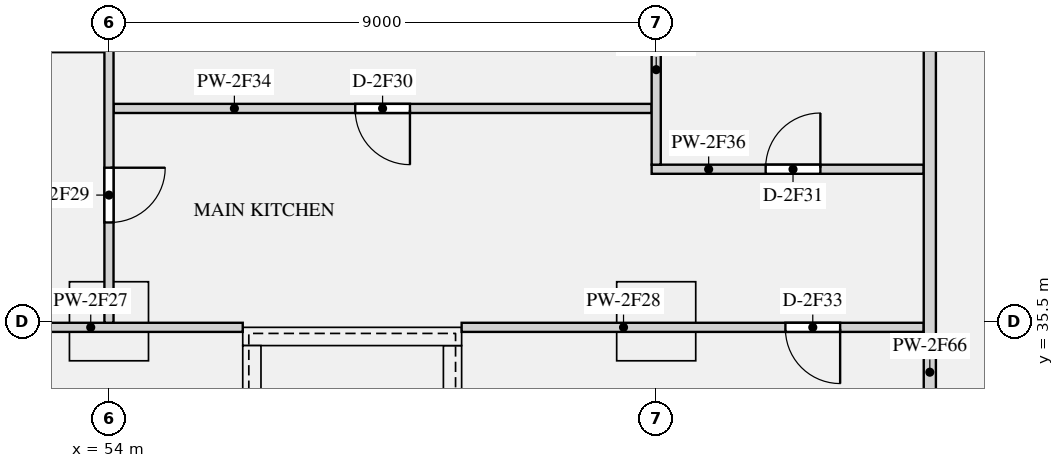
"""IFC4 building model, lengths in metres.
Left out: names, types, materials, properties, quantities, classifications, styles, units other than length and angle.
Written with IfcOpenShell. Run it as: python <this file> out.ifc"""

import sys

from ifc_helpers import new_model, si_unit, direction, frame, frame_2d, origin, origin_2d, place, context, subcontext, project, spatial, rectangle, extrude, element, fill, save


model = new_model("IFC4")
c1 = context("Model", 3, precision=1e-05, world=origin(), true_north=direction((0.0, 1.0)))
c2 = subcontext(c1, "Body", "Model", "MODEL_VIEW")
j1 = project(units=[si_unit("LENGTHUNIT", "METRE"), si_unit("PLANEANGLEUNIT", "RADIAN")], contexts=[c1])
p1 = place(None, origin())
s1 = spatial("IfcSite", under=j1, at=p1, CompositionType="ELEMENT")
p2 = place(p1, origin())
s2 = spatial("IfcBuilding", under=s1, at=p2, CompositionType="ELEMENT")
p3 = place(p2, frame((0.0, 0.0, 127.65)))
s3 = spatial("IfcBuildingStorey", under=s2, at=p3, CompositionType="ELEMENT", Elevation=127.65)
for number, where, z_axis, x_axis in (
    (1, (54.0, 35.5, 0.0), (0.0, 0.0, 1.0), (1.0, 0.0, 0.0)),
    (2, (63.0, 35.5, 0.0), (0.0, 0.0, 1.0), (1.0, 0.0, 0.0)),
):
    element("IfcColumn", number, at=place(p3, frame(where, z_axis=z_axis, x_axis=x_axis)), inside=s3, PredefinedType="COLUMN", context=c2, shape_type="SweptSolid", body=[
        extrude(rectangle(XDim=1.3, YDim=1.3, at=origin_2d()), origin(), (0.0, 0.0, 1.0), 3.15),
    ])
p4 = place(p3, frame((56.2, 35.25, 0.0), z_axis=(0.0, 0.0, 1.0), x_axis=(1.0, 0.0, 0.0)))
e3 = element("IfcWall", 3, at=p4, inside=s3, PredefinedType="SHEAR", context=c2, shape_type="SweptSolid", body=[
    extrude(rectangle(XDim=3.6, YDim=0.3, at=frame_2d((1.8, 0.0))), origin(), (0.0, 0.0, 1.0), 3.15),
])
for number, where, z_axis, x_axis in (
    (4, (56.35, 27.3, 0.0), (0.0, 0.0, 1.0), (0.0, 1.0, 0.0)),
    (5, (59.65, 27.3, 0.0), (0.0, 0.0, 1.0), (0.0, 1.0, 0.0)),
):
    element("IfcWall", number, at=place(p3, frame(where, z_axis=z_axis, x_axis=x_axis)), inside=s3, PredefinedType="SHEAR", context=c2, shape_type="SweptSolid", body=[
        extrude(rectangle(XDim=7.8, YDim=0.3, at=frame_2d((3.9, 0.0))), origin(), (0.0, 0.0, 1.0), 3.15),
    ])
p5 = place(p3, frame((48.1, 35.4, 0.0), z_axis=(0.0, 0.0, 1.0), x_axis=(1.0, 0.0, 0.0)))
e6 = element("IfcWall", 6, at=p5, inside=s3, PredefinedType="PARTITIONING", context=c2, shape_type="SweptSolid", body=[
    extrude(rectangle(XDim=8.1, YDim=0.15, at=frame_2d((4.05, 0.0))), origin(), (0.0, 0.0, 1.0), 2.65),
])
p6 = place(p5, frame((2.2, 0.0, 0.0)))
e7 = element("IfcOpeningElement", 7, at=p6, cuts=e6, PredefinedType="OPENING", context=c2, shape_type="SweptSolid", body=[
    extrude(rectangle(XDim=0.9, YDim=2.1, at=frame_2d((0.45, 1.05))), frame((0.0, 0.085, 0.0), z_axis=(0.0, -1.0, 0.0), x_axis=(1.0, 0.0, 0.0)), (0.0, 0.0, 1.0), 0.17),
])
p7 = place(p3, frame((59.8, 35.4, 0.0), z_axis=(0.0, 0.0, 1.0), x_axis=(1.0, 0.0, 0.0)))
e8 = element("IfcWall", 8, at=p7, inside=s3, PredefinedType="PARTITIONING", context=c2, shape_type="SweptSolid", body=[
    extrude(rectangle(XDim=7.6, YDim=0.15, at=frame_2d((3.8, 0.0))), origin(), (0.0, 0.0, 1.0), 2.65),
])
p8 = place(p7, frame((5.325, 0.0, 0.0)))
e9 = element("IfcOpeningElement", 9, at=p8, cuts=e8, PredefinedType="OPENING", context=c2, shape_type="SweptSolid", body=[
    extrude(rectangle(XDim=0.9, YDim=2.1, at=frame_2d((0.45, 1.05))), frame((0.0, 0.085, 0.0), z_axis=(0.0, -1.0, 0.0), x_axis=(1.0, 0.0, 0.0)), (0.0, 0.0, 1.0), 0.17),
])
p9 = place(p3, frame((54.075, 39.0, 0.0), z_axis=(0.0, 0.0, 1.0), x_axis=(1.0, 0.0, 0.0)))
e10 = element("IfcWall", 10, at=p9, inside=s3, PredefinedType="PARTITIONING", context=c2, shape_type="SweptSolid", body=[
    extrude(rectangle(XDim=8.85, YDim=0.15, at=frame_2d((4.425, 0.0))), origin(), (0.0, 0.0, 1.0), 2.65),
])
p10 = place(p9, frame((3.975, 0.0, 0.0)))
e11 = element("IfcOpeningElement", 11, at=p10, cuts=e10, PredefinedType="OPENING", context=c2, shape_type="SweptSolid", body=[
    extrude(rectangle(XDim=0.9, YDim=2.1, at=frame_2d((0.45, 1.05))), frame((0.0, 0.085, 0.0), z_axis=(0.0, -1.0, 0.0), x_axis=(1.0, 0.0, 0.0)), (0.0, 0.0, 1.0), 0.17),
])
p11 = place(p3, frame((62.925, 38.0, 0.0), z_axis=(0.0, 0.0, 1.0), x_axis=(1.0, 0.0, 0.0)))
e12 = element("IfcWall", 12, at=p11, inside=s3, PredefinedType="PARTITIONING", context=c2, shape_type="SweptSolid", body=[
    extrude(rectangle(XDim=4.475, YDim=0.15, at=frame_2d((2.237, 0.0))), origin(), (0.0, 0.0, 1.0), 2.65),
])
p12 = place(p11, frame((1.875, 0.0, 0.0)))
e13 = element("IfcOpeningElement", 13, at=p12, cuts=e12, PredefinedType="OPENING", context=c2, shape_type="SweptSolid", body=[
    extrude(rectangle(XDim=0.9, YDim=2.1, at=frame_2d((0.45, 1.05))), frame((0.0, 0.085, 0.0), z_axis=(0.0, -1.0, 0.0), x_axis=(1.0, 0.0, 0.0)), (0.0, 0.0, 1.0), 0.17),
])
p13 = place(p3, frame((54.0, 35.475, 0.0), z_axis=(0.0, 0.0, 1.0), x_axis=(0.0, 1.0, 0.0)))
e14 = element("IfcWall", 14, at=p13, inside=s3, PredefinedType="PARTITIONING", context=c2, shape_type="SweptSolid", body=[
    extrude(rectangle(XDim=9.275, YDim=0.15, at=frame_2d((4.637, 0.0))), origin(), (0.0, 0.0, 1.0), 2.65),
])
p14 = place(p13, frame((1.65, 0.0, 0.0)))
e15 = element("IfcOpeningElement", 15, at=p14, cuts=e14, PredefinedType="OPENING", context=c2, shape_type="SweptSolid", body=[
    extrude(rectangle(XDim=0.9, YDim=2.1, at=frame_2d((0.45, 1.05))), frame((0.0, 0.085, 0.0), z_axis=(0.0, -1.0, 0.0), x_axis=(1.0, 0.0, 0.0)), (0.0, 0.0, 1.0), 0.17),
])
p15 = place(p3, frame((63.0, 38.075, 0.0), z_axis=(0.0, 0.0, 1.0), x_axis=(0.0, 1.0, 0.0)))
e16 = element("IfcWall", 16, at=p15, inside=s3, PredefinedType="PARTITIONING", context=c2, shape_type="SweptSolid", body=[
    extrude(rectangle(XDim=6.675, YDim=0.15, at=frame_2d((3.337, 0.0))), origin(), (0.0, 0.0, 1.0), 2.65),
])
p16 = place(p15, frame((3.125, 0.0, 0.0)))
e17 = element("IfcOpeningElement", 17, at=p16, cuts=e16, PredefinedType="OPENING", context=c2, shape_type="SweptSolid", body=[
    extrude(rectangle(XDim=1.5, YDim=2.1, at=frame_2d((0.75, 1.05))), frame((0.0, 0.085, 0.0), z_axis=(0.0, -1.0, 0.0), x_axis=(1.0, 0.0, 0.0)), (0.0, 0.0, 1.0), 0.17),
])
p17 = place(p3, frame((67.5, 24.575, 0.0), z_axis=(0.0, 0.0, 1.0), x_axis=(0.0, 1.0, 0.0)))
e18 = element("IfcWall", 18, at=p17, inside=s3, PredefinedType="PARTITIONING", context=c2, shape_type="SweptSolid", body=[
    extrude(rectangle(XDim=20.175, YDim=0.2, at=frame_2d((10.087, 0.0))), origin(), (0.0, 0.0, 1.0), 2.65),
])
p18 = place(p14, frame((0.9, 0.0, 0.0), z_axis=(0.0, 0.0, 1.0), x_axis=(-1.0, 0.0, 0.0)))
e19 = element("IfcDoor", 19, at=p18, inside=s3, OperationType="SINGLE_SWING_LEFT", PredefinedType="DOOR", context=c2, shape_type="SweptSolid", body=[
    extrude(rectangle(XDim=0.9, YDim=2.1, at=frame_2d((0.45, 1.05))), frame((0.0, 0.025, 0.0), z_axis=(0.0, -1.0, 0.0), x_axis=(1.0, 0.0, 0.0)), (0.0, 0.0, 1.0), 0.05),
])
fill(e15, e19)
p19 = place(p10, frame((0.9, 0.0, 0.0), z_axis=(0.0, 0.0, 1.0), x_axis=(-1.0, 0.0, 0.0)))
e20 = element("IfcDoor", 20, at=p19, inside=s3, OperationType="SINGLE_SWING_LEFT", PredefinedType="DOOR", context=c2, shape_type="SweptSolid", body=[
    extrude(rectangle(XDim=0.9, YDim=2.1, at=frame_2d((0.45, 1.05))), frame((0.0, 0.025, 0.0), z_axis=(0.0, -1.0, 0.0), x_axis=(1.0, 0.0, 0.0)), (0.0, 0.0, 1.0), 0.05),
])
fill(e11, e20)
p20 = place(p12, origin())
e21 = element("IfcDoor", 21, at=p20, inside=s3, OperationType="SINGLE_SWING_RIGHT", PredefinedType="DOOR", context=c2, shape_type="SweptSolid", body=[
    extrude(rectangle(XDim=0.9, YDim=2.1, at=frame_2d((0.45, 1.05))), frame((0.0, 0.025, 0.0), z_axis=(0.0, -1.0, 0.0), x_axis=(1.0, 0.0, 0.0)), (0.0, 0.0, 1.0), 0.05),
])
fill(e13, e21)
p21 = place(p8, frame((0.9, 0.0, 0.0), z_axis=(0.0, 0.0, 1.0), x_axis=(-1.0, 0.0, 0.0)))
e22 = element("IfcDoor", 22, at=p21, inside=s3, OperationType="SINGLE_SWING_LEFT", PredefinedType="DOOR", context=c2, shape_type="SweptSolid", body=[
    extrude(rectangle(XDim=0.9, YDim=2.1, at=frame_2d((0.45, 1.05))), frame((0.0, 0.025, 0.0), z_axis=(0.0, -1.0, 0.0), x_axis=(1.0, 0.0, 0.0)), (0.0, 0.0, 1.0), 0.05),
])
fill(e9, e22)
save(model, sys.argv[1])
